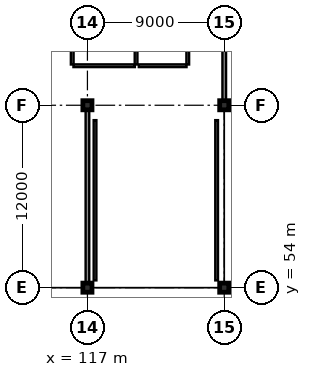
"""IFC4 building model, lengths in metres.
Left out: names, types, materials, properties, quantities, classifications, styles, units other than length and angle.
Written with IfcOpenShell. Run it as: python <this file> out.ifc"""

import sys

from ifc_helpers import new_model, si_unit, direction, frame, frame_2d, origin, origin_2d, place, context, subcontext, project, spatial, rectangle, extrude, element, fill, save


model = new_model("IFC4")
c1 = context("Model", 3, precision=1e-05, world=origin(), true_north=direction((0.0, 1.0)))
c2 = subcontext(c1, "Body", "Model", "MODEL_VIEW")
j1 = project(units=[si_unit("LENGTHUNIT", "METRE"), si_unit("PLANEANGLEUNIT", "RADIAN")], contexts=[c1])
p1 = place(None, origin())
s1 = spatial("IfcSite", under=j1, at=p1, CompositionType="ELEMENT")
p2 = place(p1, origin())
s2 = spatial("IfcBuilding", under=s1, at=p2, CompositionType="ELEMENT")
p3 = place(p2, frame((0.0, 0.0, -4.5)))
s3 = spatial("IfcBuildingStorey", under=s2, at=p3, CompositionType="ELEMENT", Elevation=-4.5)
for number, where, z_axis, x_axis in (
    (1, (117.0, 54.0, 0.0), (0.0, 0.0, 1.0), (1.0, 0.0, 0.0)),
    (2, (117.0, 66.0, 0.0), (0.0, 0.0, 1.0), (1.0, 0.0, 0.0)),
    (3, (126.0, 54.0, 0.0), (0.0, 0.0, 1.0), (1.0, 0.0, 0.0)),
    (4, (126.0, 66.0, 0.0), (0.0, 0.0, 1.0), (1.0, 0.0, 0.0)),
):
    element("IfcColumn", number, at=place(p3, frame(where, z_axis=z_axis, x_axis=x_axis)), inside=s3, PredefinedType="COLUMN", context=c2, shape_type="SweptSolid", body=[
        extrude(rectangle(XDim=0.6, YDim=0.6, at=origin_2d()), origin(), (0.0, 0.0, 1.0), 4.5),
    ])
p4 = place(p3, frame((126.0, 66.296, 0.0), z_axis=(0.0, 0.0, 1.0), x_axis=(0.0, 1.0, 0.0)))
e5 = element("IfcWall", 5, at=p4, inside=s3, PredefinedType="SHEAR", context=c2, shape_type="SweptSolid", body=[
    extrude(rectangle(XDim=11.358, YDim=0.24, at=frame_2d((5.679, 0.0))), origin(), (0.0, 0.0, 1.0), 3.755),
])
p5 = place(p3, frame((117.0, 54.296, 0.0), z_axis=(0.0, 0.0, 1.0), x_axis=(0.0, 1.0, 0.0)))
e6 = element("IfcWall", 6, at=p5, inside=s3, PredefinedType="SHEAR", context=c2, shape_type="SweptSolid", body=[
    extrude(rectangle(XDim=11.408, YDim=0.24, at=frame_2d((5.704, 0.0))), origin(), (0.0, 0.0, 1.0), 3.825),
])
p6 = place(p3, frame((120.12, 68.6, 0.0), z_axis=(0.0, 0.0, 1.0), x_axis=(-1.0, 0.0, 0.0)))
e7 = element("IfcWall", 7, at=p6, inside=s3, PredefinedType="PARTITIONING", context=c2, shape_type="SweptSolid", body=[
    extrude(rectangle(XDim=4.04, YDim=0.18, at=frame_2d((2.02, 0.0))), origin(), (0.0, 0.0, 1.0), 4.14),
])
p7 = place(p3, frame((116.0, 68.68, 0.0), z_axis=(0.0, 0.0, 1.0), x_axis=(0.0, 1.0, 0.0)))
e8 = element("IfcWall", 8, at=p7, inside=s3, PredefinedType="PARTITIONING", context=c2, shape_type="SweptSolid", body=[
    extrude(rectangle(XDim=4.29, YDim=0.18, at=frame_2d((2.145, 0.0))), origin(), (0.0, 0.0, 1.0), 4.14),
])
p8 = place(p7, frame((1.42, 0.0, 0.0)))
e9 = element("IfcOpeningElement", 9, at=p8, cuts=e8, PredefinedType="OPENING", context=c2, shape_type="SweptSolid", body=[
    extrude(rectangle(XDim=1.45, YDim=2.3, at=frame_2d((0.725, 1.15))), frame((0.0, 0.105, 0.0), z_axis=(0.0, -1.0, 0.0), x_axis=(1.0, 0.0, 0.0)), (0.0, 0.0, 1.0), 0.21),
])
p9 = place(p3, frame((120.2, 72.97, 0.0), z_axis=(0.0, 0.0, 1.0), x_axis=(0.0, -1.0, 0.0)))
e10 = element("IfcWall", 10, at=p9, inside=s3, PredefinedType="PARTITIONING", context=c2, shape_type="SweptSolid", body=[
    extrude(rectangle(XDim=4.29, YDim=0.18, at=frame_2d((2.145, 0.0))), origin(), (0.0, 0.0, 1.0), 3.835),
])
p10 = place(p3, frame((123.6, 72.97, 0.0), z_axis=(0.0, 0.0, 1.0), x_axis=(0.0, -1.0, 0.0)))
e11 = element("IfcWall", 11, at=p10, inside=s3, PredefinedType="PARTITIONING", context=c2, shape_type="SweptSolid", body=[
    extrude(rectangle(XDim=4.29, YDim=0.18, at=frame_2d((2.145, 0.0))), origin(), (0.0, 0.0, 1.0), 4.14),
])
p11 = place(p3, frame((123.52, 68.6, 0.0), z_axis=(0.0, 0.0, 1.0), x_axis=(-1.0, 0.0, 0.0)))
e12 = element("IfcWall", 12, at=p11, inside=s3, PredefinedType="PARTITIONING", context=c2, shape_type="SweptSolid", body=[
    extrude(rectangle(XDim=3.14, YDim=0.18, at=frame_2d((1.57, 0.0))), origin(), (0.0, 0.0, 1.0), 4.14),
])
p12 = place(p11, frame((0.845, 0.0, 0.0)))
e13 = element("IfcOpeningElement", 13, at=p12, cuts=e12, PredefinedType="OPENING", context=c2, shape_type="SweptSolid", body=[
    extrude(rectangle(XDim=1.45, YDim=2.3, at=frame_2d((0.725, 1.15))), frame((0.0, 0.105, 0.0), z_axis=(0.0, -1.0, 0.0), x_axis=(1.0, 0.0, 0.0)), (0.0, 0.0, 1.0), 0.21),
])
p13 = place(p3, frame((117.5, 54.48, 0.0), z_axis=(0.0, 0.0, 1.0), x_axis=(0.0, 1.0, 0.0)))
e14 = element("IfcWall", 14, at=p13, inside=s3, PredefinedType="PARTITIONING", context=c2, shape_type="SweptSolid", body=[
    extrude(rectangle(XDim=10.54, YDim=0.18, at=frame_2d((5.27, 0.0))), origin(), (0.0, 0.0, 1.0), 4.14),
])
p14 = place(p3, frame((125.5, 65.02, 0.0), z_axis=(0.0, 0.0, 1.0), x_axis=(0.0, -1.0, 0.0)))
e15 = element("IfcWall", 15, at=p14, inside=s3, PredefinedType="PARTITIONING", context=c2, shape_type="SweptSolid", body=[
    extrude(rectangle(XDim=10.54, YDim=0.18, at=frame_2d((5.27, 0.0))), origin(), (0.0, 0.0, 1.0), 4.14),
])
p15 = place(p14, frame((4.695, 0.0, 0.0)))
e16 = element("IfcOpeningElement", 16, at=p15, cuts=e15, PredefinedType="OPENING", context=c2, shape_type="SweptSolid", body=[
    extrude(rectangle(XDim=1.15, YDim=2.15, at=frame_2d((0.575, 1.075))), frame((0.0, 0.105, 0.0), z_axis=(0.0, -1.0, 0.0), x_axis=(1.0, 0.0, 0.0)), (0.0, 0.0, 1.0), 0.21),
])
p16 = place(p14, frame((7.59, 0.0, 1.05)))
e17 = element("IfcOpeningElement", 17, at=p16, cuts=e15, PredefinedType="OPENING", context=c2, shape_type="SweptSolid", body=[
    extrude(rectangle(XDim=2.1, YDim=1.2, at=frame_2d((1.05, 0.6))), frame((0.0, 0.105, 0.0), z_axis=(0.0, -1.0, 0.0), x_axis=(1.0, 0.0, 0.0)), (0.0, 0.0, 1.0), 0.21),
])
p17 = place(p12, frame((1.45, 0.0, 0.0), z_axis=(0.0, 0.0, 1.0), x_axis=(-1.0, 0.0, 0.0)))
e18 = element("IfcDoor", 18, at=p17, inside=s3, OperationType="DOUBLE_DOOR_SINGLE_SWING", PredefinedType="DOOR", context=c2, shape_type="SweptSolid", body=[
    extrude(rectangle(XDim=1.45, YDim=2.3, at=frame_2d((0.725, 1.15))), frame((0.0, 0.025, 0.0), z_axis=(0.0, -1.0, 0.0), x_axis=(1.0, 0.0, 0.0)), (0.0, 0.0, 1.0), 0.05),
])
fill(e13, e18)
p18 = place(p15, frame((1.15, 0.0, 0.0), z_axis=(0.0, 0.0, 1.0), x_axis=(-1.0, 0.0, 0.0)))
e19 = element("IfcDoor", 19, at=p18, inside=s3, OperationType="SINGLE_SWING_RIGHT", PredefinedType="DOOR", context=c2, shape_type="SweptSolid", body=[
    extrude(rectangle(XDim=1.15, YDim=2.15, at=frame_2d((0.575, 1.075))), frame((0.0, 0.025, 0.0), z_axis=(0.0, -1.0, 0.0), x_axis=(1.0, 0.0, 0.0)), (0.0, 0.0, 1.0), 0.05),
])
fill(e16, e19)
p19 = place(p16, origin())
e20 = element("IfcWindow", 20, at=p19, inside=s3, PartitioningType="SINGLE_PANEL", PredefinedType="WINDOW", context=c2, shape_type="SweptSolid", body=[
    extrude(rectangle(XDim=2.1, YDim=1.2, at=frame_2d((1.05, 0.6))), frame((0.0, 0.03, 0.0), z_axis=(0.0, -1.0, 0.0), x_axis=(1.0, 0.0, 0.0)), (0.0, 0.0, 1.0), 0.06),
])
fill(e17, e20)
save(model, sys.argv[1])
